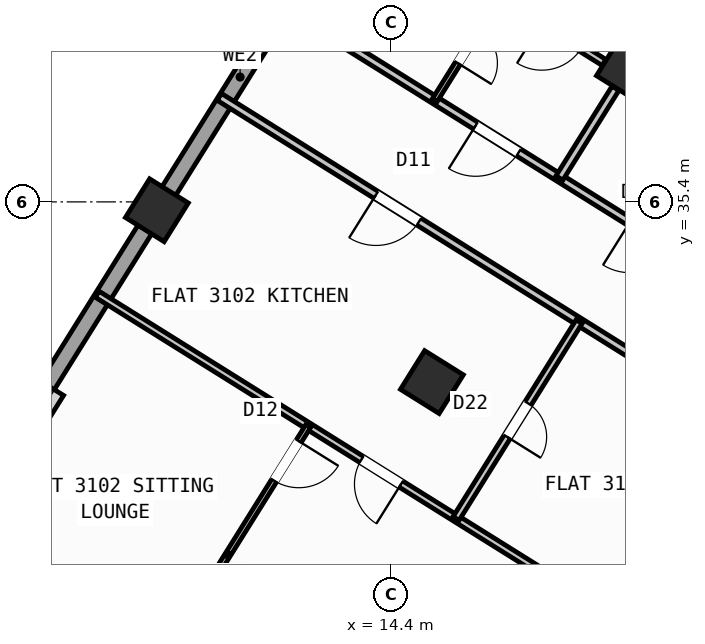
"""IFC4 building model, lengths in metres.
Left out: names, types, materials, properties, quantities, classifications, styles, units other than length and angle.
Written with IfcOpenShell. Run it as: python <this file> out.ifc"""

import sys

from ifc_helpers import new_model, si_unit, direction, frame, frame_2d, origin, origin_2d, place, context, subcontext, project, spatial, rectangle, hollow_rectangle, extrude, source, transform, mapped, element, fill, save


model = new_model("IFC4")
c1 = context("Model", 3, precision=1e-05, world=origin(), true_north=direction((0.0, 1.0)))
c2 = subcontext(c1, "Body", "Model", "MODEL_VIEW")
j1 = project(units=[si_unit("LENGTHUNIT", "METRE"), si_unit("PLANEANGLEUNIT", "RADIAN")], contexts=[c1])
p1 = place(None, origin())
s1 = spatial("IfcSite", under=j1, at=p1, CompositionType="ELEMENT")
p2 = place(p1, origin())
s2 = spatial("IfcBuilding", under=s1, at=p2, CompositionType="ELEMENT")
p3 = place(p2, frame((0.0, 0.0, 123.3)))
s3 = spatial("IfcBuildingStorey", under=s2, at=p3, CompositionType="ELEMENT", Elevation=123.3)
m1 = source(origin(), c2, "Body", "SweptSolid", [
    extrude(hollow_rectangle(XDim=0.9, YDim=0.9, WallThickness=0.036, at=origin_2d()), origin(), (0.0, 0.0, 1.0), 4.5),
])
for number, where, z_axis, x_axis in (
    (1, (19.073, 38.034, 0.0), (0.0, 0.0, 1.0), (-0.848, 0.53, 0.0)),
    (2, (15.205, 31.844, 0.0), (0.0, 0.0, 1.0), (-0.848, 0.53, 0.0)),
    (3, (9.777, 35.235, 0.0), (0.0, 0.0, 1.0), (-0.848, 0.53, 0.0)),
):
    element("IfcColumn", number, at=place(p3, frame(where, z_axis=z_axis, x_axis=x_axis)), inside=s3, PredefinedType="COLUMN", context=c2, shape_type="MappedRepresentation", body=[
        mapped(m1, transform((0.0, 0.0, 0.0), scale=1.0)),
    ])
p4 = place(p3, frame((31.76, 12.183, 0.0), z_axis=(0.0, 0.0, 1.0), x_axis=(-0.848047074256, 0.529920899612, 0.0)))
e4 = element("IfcWall", 4, at=p4, inside=s3, PredefinedType="STANDARD", context=c2, shape_type="SweptSolid", body=[
    extrude(rectangle(XDim=30.652, YDim=0.32, at=frame_2d((15.326, 0.0))), origin(), (0.0, 0.0, 1.0), 4.22),
])
p5 = place(p4, frame((14.966, 0.0, 0.0)))
e5 = element("IfcOpeningElement", 5, at=p5, cuts=e4, PredefinedType="OPENING", context=c2, shape_type="SweptSolid", body=[
    extrude(rectangle(XDim=1.2, YDim=2.15, at=frame_2d((0.6, 1.075))), frame((0.0, 0.17, 0.0), z_axis=(0.0, -1.0, 0.0), x_axis=(1.0, 0.0, 0.0)), (0.0, 0.0, 1.0), 0.34),
])
p6 = place(p4, frame((1.871, 0.0, 0.8)))
e6 = element("IfcOpeningElement", 6, at=p6, cuts=e4, PredefinedType="OPENING", context=c2, shape_type="SweptSolid", body=[
    extrude(rectangle(XDim=2.1, YDim=1.55, at=frame_2d((1.05, 0.775))), frame((0.0, 0.17, 0.0), z_axis=(0.0, -1.0, 0.0), x_axis=(1.0, 0.0, 0.0)), (0.0, 0.0, 1.0), 0.34),
])
p7 = place(p4, frame((6.546, 0.0, 0.8)))
e7 = element("IfcOpeningElement", 7, at=p7, cuts=e4, PredefinedType="OPENING", context=c2, shape_type="SweptSolid", body=[
    extrude(rectangle(XDim=2.1, YDim=1.55, at=frame_2d((1.05, 0.775))), frame((0.0, 0.17, 0.0), z_axis=(0.0, -1.0, 0.0), x_axis=(1.0, 0.0, 0.0)), (0.0, 0.0, 1.0), 0.34),
])
p8 = place(p4, frame((20.508, 0.0, 0.85)))
e8 = element("IfcOpeningElement", 8, at=p8, cuts=e4, PredefinedType="OPENING", context=c2, shape_type="SweptSolid", body=[
    extrude(rectangle(XDim=1.5, YDim=1.5, at=frame_2d((0.75, 0.75))), frame((0.0, 0.17, 0.0), z_axis=(0.0, -1.0, 0.0), x_axis=(1.0, 0.0, 0.0)), (0.0, 0.0, 1.0), 0.34),
])
p9 = place(p4, frame((27.253, 0.0, 0.95)))
e9 = element("IfcOpeningElement", 9, at=p9, cuts=e4, PredefinedType="OPENING", context=c2, shape_type="SweptSolid", body=[
    extrude(rectangle(XDim=1.2, YDim=1.4, at=frame_2d((0.6, 0.7))), frame((0.0, 0.17, 0.0), z_axis=(0.0, -1.0, 0.0), x_axis=(1.0, 0.0, 0.0)), (0.0, 0.0, 1.0), 0.34),
])
p10 = place(p3, frame((5.7, 28.71, 0.0), z_axis=(0.0, 0.0, 1.0), x_axis=(0.529923711467, 0.8480453172, 0.0)))
e10 = element("IfcWall", 10, at=p10, inside=s3, PredefinedType="STANDARD", context=c2, shape_type="SweptSolid", body=[
    extrude(rectangle(XDim=21.587, YDim=0.32, at=frame_2d((10.794, 0.0))), origin(), (0.0, 0.0, 1.0), 2.395),
])
p11 = place(p10, frame((2.719, 0.0, 1.0)))
e11 = element("IfcOpeningElement", 11, at=p11, cuts=e10, PredefinedType="OPENING", context=c2, shape_type="SweptSolid", body=[
    extrude(rectangle(XDim=0.9, YDim=1.25, at=frame_2d((0.45, 0.625))), frame((0.0, 0.17, 0.0), z_axis=(0.0, -1.0, 0.0), x_axis=(1.0, 0.0, 0.0)), (0.0, 0.0, 1.0), 0.34),
])
p12 = place(p10, frame((16.525, 0.0, 1.0)))
e12 = element("IfcOpeningElement", 12, at=p12, cuts=e10, PredefinedType="OPENING", context=c2, shape_type="SweptSolid", body=[
    extrude(rectangle(XDim=0.9, YDim=1.25, at=frame_2d((0.45, 0.625))), frame((0.0, 0.17, 0.0), z_axis=(0.0, -1.0, 0.0), x_axis=(1.0, 0.0, 0.0)), (0.0, 0.0, 1.0), 0.34),
])
p13 = place(p10, frame((18.887, 0.0, 1.0)))
e13 = element("IfcOpeningElement", 13, at=p13, cuts=e10, PredefinedType="OPENING", context=c2, shape_type="SweptSolid", body=[
    extrude(rectangle(XDim=0.9, YDim=1.25, at=frame_2d((0.45, 0.625))), frame((0.0, 0.17, 0.0), z_axis=(0.0, -1.0, 0.0), x_axis=(1.0, 0.0, 0.0)), (0.0, 0.0, 1.0), 0.34),
])
p14 = place(p3, frame((17.424, 47.083, 0.0), z_axis=(0.0, 0.0, 1.0), x_axis=(0.848049927979, -0.529916332693, 0.0)))
e14 = element("IfcWall", 14, at=p14, inside=s3, PredefinedType="STANDARD", context=c2, shape_type="SweptSolid", body=[
    extrude(rectangle(XDim=29.223, YDim=0.32, at=frame_2d((14.612, 0.0))), origin(), (0.0, 0.0, 1.0), 4.22),
])
p15 = place(p14, frame((8.839, 0.0, 0.0)))
e15 = element("IfcOpeningElement", 15, at=p15, cuts=e14, PredefinedType="OPENING", context=c2, shape_type="SweptSolid", body=[
    extrude(rectangle(XDim=1.05, YDim=2.15, at=frame_2d((0.525, 1.075))), frame((0.0, 0.17, 0.0), z_axis=(0.0, -1.0, 0.0), x_axis=(1.0, 0.0, 0.0)), (0.0, 0.0, 1.0), 0.34),
])
p16 = place(p14, frame((0.719, 0.0, 0.85)))
e16 = element("IfcOpeningElement", 16, at=p16, cuts=e14, PredefinedType="OPENING", context=c2, shape_type="SweptSolid", body=[
    extrude(rectangle(XDim=1.8, YDim=1.5, at=frame_2d((0.9, 0.75))), frame((0.0, 0.17, 0.0), z_axis=(0.0, -1.0, 0.0), x_axis=(1.0, 0.0, 0.0)), (0.0, 0.0, 1.0), 0.34),
])
p17 = place(p14, frame((3.981, 0.0, 0.85)))
e17 = element("IfcOpeningElement", 17, at=p17, cuts=e14, PredefinedType="OPENING", context=c2, shape_type="SweptSolid", body=[
    extrude(rectangle(XDim=1.5, YDim=1.5, at=frame_2d((0.75, 0.75))), frame((0.0, 0.17, 0.0), z_axis=(0.0, -1.0, 0.0), x_axis=(1.0, 0.0, 0.0)), (0.0, 0.0, 1.0), 0.34),
])
p18 = place(p14, frame((7.021, 0.0, 0.95)))
e18 = element("IfcOpeningElement", 18, at=p18, cuts=e14, PredefinedType="OPENING", context=c2, shape_type="SweptSolid", body=[
    extrude(rectangle(XDim=1.2, YDim=1.4, at=frame_2d((0.6, 0.7))), frame((0.0, 0.17, 0.0), z_axis=(0.0, -1.0, 0.0), x_axis=(1.0, 0.0, 0.0)), (0.0, 0.0, 1.0), 0.34),
])
p19 = place(p14, frame((14.471, 0.0, 0.95)))
e19 = element("IfcOpeningElement", 19, at=p19, cuts=e14, PredefinedType="OPENING", context=c2, shape_type="SweptSolid", body=[
    extrude(rectangle(XDim=1.2, YDim=1.4, at=frame_2d((0.6, 0.7))), frame((0.0, 0.17, 0.0), z_axis=(0.0, -1.0, 0.0), x_axis=(1.0, 0.0, 0.0)), (0.0, 0.0, 1.0), 0.34),
])
p20 = place(p14, frame((17.254, 0.0, 1.0)))
e20 = element("IfcOpeningElement", 20, at=p20, cuts=e14, PredefinedType="OPENING", context=c2, shape_type="SweptSolid", body=[
    extrude(rectangle(XDim=0.9, YDim=1.25, at=frame_2d((0.45, 0.625))), frame((0.0, 0.17, 0.0), z_axis=(0.0, -1.0, 0.0), x_axis=(1.0, 0.0, 0.0)), (0.0, 0.0, 1.0), 0.34),
])
p21 = place(p14, frame((20.764, 0.0, 0.8)))
e21 = element("IfcOpeningElement", 21, at=p21, cuts=e14, PredefinedType="OPENING", context=c2, shape_type="SweptSolid", body=[
    extrude(rectangle(XDim=2.1, YDim=1.55, at=frame_2d((1.05, 0.775))), frame((0.0, 0.17, 0.0), z_axis=(0.0, -1.0, 0.0), x_axis=(1.0, 0.0, 0.0)), (0.0, 0.0, 1.0), 0.34),
])
p22 = place(p14, frame((25.403, 0.0, 0.8)))
e22 = element("IfcOpeningElement", 22, at=p22, cuts=e14, PredefinedType="OPENING", context=c2, shape_type="SweptSolid", body=[
    extrude(rectangle(XDim=2.1, YDim=1.55, at=frame_2d((1.05, 0.775))), frame((0.0, 0.17, 0.0), z_axis=(0.0, -1.0, 0.0), x_axis=(1.0, 0.0, 0.0)), (0.0, 0.0, 1.0), 0.34),
])
p23 = place(p3, frame((26.363, 30.472, 0.0), z_axis=(0.0, 0.0, 1.0), x_axis=(-0.848052408131, 0.529912363569, 0.0)))
e23 = element("IfcWall", 23, at=p23, inside=s3, PredefinedType="PARTITIONING", context=c2, shape_type="SweptSolid", body=[
    extrude(rectangle(XDim=16.73, YDim=0.16, at=frame_2d((8.365, 0.0))), origin(), (0.0, 0.0, 1.0), 4.21),
])
p24 = place(p23, frame((7.55, 0.0, 0.0)))
e24 = element("IfcOpeningElement", 24, at=p24, cuts=e23, PredefinedType="OPENING", context=c2, shape_type="SweptSolid", body=[
    extrude(rectangle(XDim=1.0, YDim=2.1, at=frame_2d((0.5, 1.05))), frame((0.0, 0.09, 0.0), z_axis=(0.0, -1.0, 0.0), x_axis=(1.0, 0.0, 0.0)), (0.0, 0.0, 1.0), 0.18),
])
p25 = place(p23, frame((11.14, 0.0, 0.0)))
e25 = element("IfcOpeningElement", 25, at=p25, cuts=e23, PredefinedType="OPENING", context=c2, shape_type="SweptSolid", body=[
    extrude(rectangle(XDim=1.0, YDim=2.1, at=frame_2d((0.5, 1.05))), frame((0.0, 0.09, 0.0), z_axis=(0.0, -1.0, 0.0), x_axis=(1.0, 0.0, 0.0)), (0.0, 0.0, 1.0), 0.18),
])
p26 = place(p3, frame((25.198, 28.606, 0.0), z_axis=(0.0, 0.0, 1.0), x_axis=(-0.848052408131, 0.529912363569, 0.0)))
e26 = element("IfcWall", 26, at=p26, inside=s3, PredefinedType="PARTITIONING", context=c2, shape_type="SweptSolid", body=[
    extrude(rectangle(XDim=16.73, YDim=0.16, at=frame_2d((8.365, 0.0))), origin(), (0.0, 0.0, 1.0), 4.21),
])
p27 = place(p26, frame((2.22, 0.0, 0.0)))
e27 = element("IfcOpeningElement", 27, at=p27, cuts=e26, PredefinedType="OPENING", context=c2, shape_type="SweptSolid", body=[
    extrude(rectangle(XDim=0.86, YDim=2.05, at=frame_2d((0.43, 1.025))), frame((0.0, 0.09, 0.0), z_axis=(0.0, -1.0, 0.0), x_axis=(1.0, 0.0, 0.0)), (0.0, 0.0, 1.0), 0.18),
])
p28 = place(p26, frame((12.084, 0.0, 0.0)))
e28 = element("IfcOpeningElement", 28, at=p28, cuts=e26, PredefinedType="OPENING", context=c2, shape_type="SweptSolid", body=[
    extrude(rectangle(XDim=1.0, YDim=2.1, at=frame_2d((0.5, 1.05))), frame((0.0, 0.09, 0.0), z_axis=(0.0, -1.0, 0.0), x_axis=(1.0, 0.0, 0.0)), (0.0, 0.0, 1.0), 0.18),
])
p29 = place(p3, frame((19.556, 26.73, 0.0), z_axis=(0.0, 0.0, 1.0), x_axis=(-0.848043949058, 0.52992590092, 0.0)))
e29 = element("IfcWall", 29, at=p29, inside=s3, PredefinedType="PLUMBINGWALL", context=c2, shape_type="SweptSolid", body=[
    extrude(rectangle(XDim=12.92, YDim=0.14, at=frame_2d((6.46, 0.0))), origin(), (0.0, 0.0, 1.0), 4.21),
])
p30 = place(p29, frame((5.849, 0.0, 0.0)))
e30 = element("IfcOpeningElement", 30, at=p30, cuts=e29, PredefinedType="OPENING", context=c2, shape_type="SweptSolid", body=[
    extrude(rectangle(XDim=0.92, YDim=2.08, at=frame_2d((0.46, 1.04))), frame((0.0, 0.08, 0.0), z_axis=(0.0, -1.0, 0.0), x_axis=(1.0, 0.0, 0.0)), (0.0, 0.0, 1.0), 0.16),
])
p31 = place(p3, frame((18.109, 33.035, 0.0), z_axis=(0.0, 0.0, 1.0), x_axis=(-0.529893526057, -0.848064178611, 0.0)))
e31 = element("IfcWall", 31, at=p31, inside=s3, PredefinedType="PLUMBINGWALL", context=c2, shape_type="SweptSolid", body=[
    extrude(rectangle(XDim=4.58, YDim=0.14, at=frame_2d((2.29, 0.0))), origin(), (0.0, 0.0, 1.0), 4.21),
])
p32 = place(p31, frame((1.9, 0.0, 0.0)))
e32 = element("IfcOpeningElement", 32, at=p32, cuts=e31, PredefinedType="OPENING", context=c2, shape_type="SweptSolid", body=[
    extrude(rectangle(XDim=0.78, YDim=2.05, at=frame_2d((0.39, 1.025))), frame((0.0, 0.08, 0.0), z_axis=(0.0, -1.0, 0.0), x_axis=(1.0, 0.0, 0.0)), (0.0, 0.0, 1.0), 0.16),
])
p33 = place(p3, frame((12.763, 30.975, 0.0), z_axis=(0.0, 0.0, 1.0), x_axis=(-0.529947646893, -0.848030360042, 0.0)))
e33 = element("IfcWall", 33, at=p33, inside=s3, PredefinedType="PARTITIONING", context=c2, shape_type="SweptSolid", body=[
    extrude(rectangle(XDim=5.99, YDim=0.11, at=frame_2d((2.995, 0.0))), origin(), (0.0, 0.0, 1.0), 4.21),
])
p34 = place(p33, frame((0.35, 0.0, 0.0)))
e34 = element("IfcOpeningElement", 34, at=p34, cuts=e33, PredefinedType="OPENING", context=c2, shape_type="SweptSolid", body=[
    extrude(rectangle(XDim=0.92, YDim=2.08, at=frame_2d((0.46, 1.04))), frame((0.0, 0.065, 0.0), z_axis=(0.0, -1.0, 0.0), x_axis=(1.0, 0.0, 0.0)), (0.0, 0.0, 1.0), 0.13),
])
p35 = place(p3, frame((18.828, 37.643, 0.0), z_axis=(0.0, 0.0, 1.0), x_axis=(-0.529904345651, -0.848057418139, 0.0)))
e35 = element("IfcWall", 35, at=p35, inside=s3, PredefinedType="PARTITIONING", context=c2, shape_type="SweptSolid", body=[
    extrude(rectangle(XDim=2.088, YDim=0.16, at=frame_2d((1.044, 0.0))), origin(), (0.0, 0.0, 1.0), 2.395),
])
p36 = place(p3, frame((20.281, 45.44, 0.0), z_axis=(0.0, 0.0, 1.0), x_axis=(-0.529917830441, -0.848048992088, 0.0)))
e36 = element("IfcWall", 36, at=p36, inside=s3, PredefinedType="PARTITIONING", context=c2, shape_type="SweptSolid", body=[
    extrude(rectangle(XDim=9.47, YDim=0.11, at=frame_2d((4.735, 0.0))), origin(), (0.0, 0.0, 1.0), 4.21),
])
p37 = place(p36, frame((7.83, 0.0, 0.0)))
e37 = element("IfcOpeningElement", 37, at=p37, cuts=e36, PredefinedType="OPENING", context=c2, shape_type="SweptSolid", body=[
    extrude(rectangle(XDim=0.78, YDim=2.05, at=frame_2d((0.39, 1.025))), frame((0.0, 0.065, 0.0), z_axis=(0.0, -1.0, 0.0), x_axis=(1.0, 0.0, 0.0)), (0.0, 0.0, 1.0), 0.13),
])
p38 = place(p36, frame((3.075, 0.0, 0.0)))
e38 = element("IfcOpeningElement", 38, at=p38, cuts=e36, PredefinedType="OPENING", context=c2, shape_type="SweptSolid", body=[
    extrude(rectangle(XDim=0.92, YDim=2.08, at=frame_2d((0.46, 1.04))), frame((0.0, 0.065, 0.0), z_axis=(0.0, -1.0, 0.0), x_axis=(1.0, 0.0, 0.0)), (0.0, 0.0, 1.0), 0.13),
])
p39 = place(p3, frame((18.602, 38.152, 0.0), z_axis=(0.0, 0.0, 1.0), x_axis=(-0.848020807548, 0.529962932634, 0.0)))
e39 = element("IfcWall", 39, at=p39, inside=s3, PredefinedType="PLUMBINGWALL", context=c2, shape_type="SweptSolid", body=[
    extrude(rectangle(XDim=2.438, YDim=0.14, at=frame_2d((1.219, 0.0))), origin(), (0.0, 0.0, 1.0), 2.395),
])
p40 = place(p39, frame((0.528, 0.0, 0.0)))
e40 = element("IfcOpeningElement", 40, at=p40, cuts=e39, PredefinedType="OPENING", context=c2, shape_type="SweptSolid", body=[
    extrude(rectangle(XDim=0.92, YDim=2.08, at=frame_2d((0.46, 1.04))), frame((0.0, 0.08, 0.0), z_axis=(0.0, -1.0, 0.0), x_axis=(1.0, 0.0, 0.0)), (0.0, 0.0, 1.0), 0.16),
])
m2 = source(origin(), c2, "Body", "SweptSolid", [
    extrude(rectangle(XDim=0.92, YDim=2.08, at=frame_2d((0.46, 1.04))), frame((0.0, 0.025, 0.0), z_axis=(0.0, -1.0, 0.0), x_axis=(1.0, 0.0, 0.0)), (0.0, 0.0, 1.0), 0.05),
])
p41 = place(p34, origin())
e41 = element("IfcDoor", 41, at=p41, inside=s3, OperationType="SINGLE_SWING_LEFT", PredefinedType="DOOR", context=c2, shape_type="MappedRepresentation", body=[
    mapped(m2, transform((0.0, 0.0, 0.0), scale=1.0)),
])
fill(e34, e41)
m3 = source(origin(), c2, "Body", "SweptSolid", [
    extrude(rectangle(XDim=1.0, YDim=2.1, at=frame_2d((0.5, 1.05))), frame((0.0, 0.025, 0.0), z_axis=(0.0, -1.0, 0.0), x_axis=(1.0, 0.0, 0.0)), (0.0, 0.0, 1.0), 0.05),
])
p42 = place(p28, origin())
e42 = element("IfcDoor", 42, at=p42, inside=s3, OperationType="SINGLE_SWING_RIGHT", PredefinedType="DOOR", context=c2, shape_type="MappedRepresentation", body=[
    mapped(m3, transform((0.0, 0.0, 0.0), scale=1.0)),
])
fill(e28, e42)
p43 = place(p30, origin())
e43 = element("IfcDoor", 43, at=p43, inside=s3, OperationType="SINGLE_SWING_LEFT", PredefinedType="DOOR", context=c2, shape_type="MappedRepresentation", body=[
    mapped(m2, transform((0.0, 0.0, 0.0), scale=1.0)),
])
fill(e30, e43)
m4 = source(origin(), c2, "Body", "SweptSolid", [
    extrude(rectangle(XDim=0.78, YDim=2.05, at=frame_2d((0.39, 1.025))), frame((0.0, 0.025, 0.0), z_axis=(0.0, -1.0, 0.0), x_axis=(1.0, 0.0, 0.0)), (0.0, 0.0, 1.0), 0.05),
])
p44 = place(p32, origin())
e44 = element("IfcDoor", 44, at=p44, inside=s3, OperationType="SINGLE_SWING_RIGHT", PredefinedType="DOOR", context=c2, shape_type="MappedRepresentation", body=[
    mapped(m4, transform((0.0, 0.0, 0.0), scale=1.0)),
])
fill(e32, e44)
p45 = place(p25, origin())
e45 = element("IfcDoor", 45, at=p45, inside=s3, OperationType="SINGLE_SWING_RIGHT", PredefinedType="DOOR", context=c2, shape_type="MappedRepresentation", body=[
    mapped(m3, transform((0.0, 0.0, 0.0), scale=1.0)),
])
fill(e25, e45)
p46 = place(p37, origin())
e46 = element("IfcDoor", 46, at=p46, inside=s3, OperationType="SINGLE_SWING_RIGHT", PredefinedType="DOOR", context=c2, shape_type="MappedRepresentation", body=[
    mapped(m4, transform((0.0, 0.0, 0.0), scale=1.0)),
])
fill(e37, e46)
save(model, sys.argv[1])
